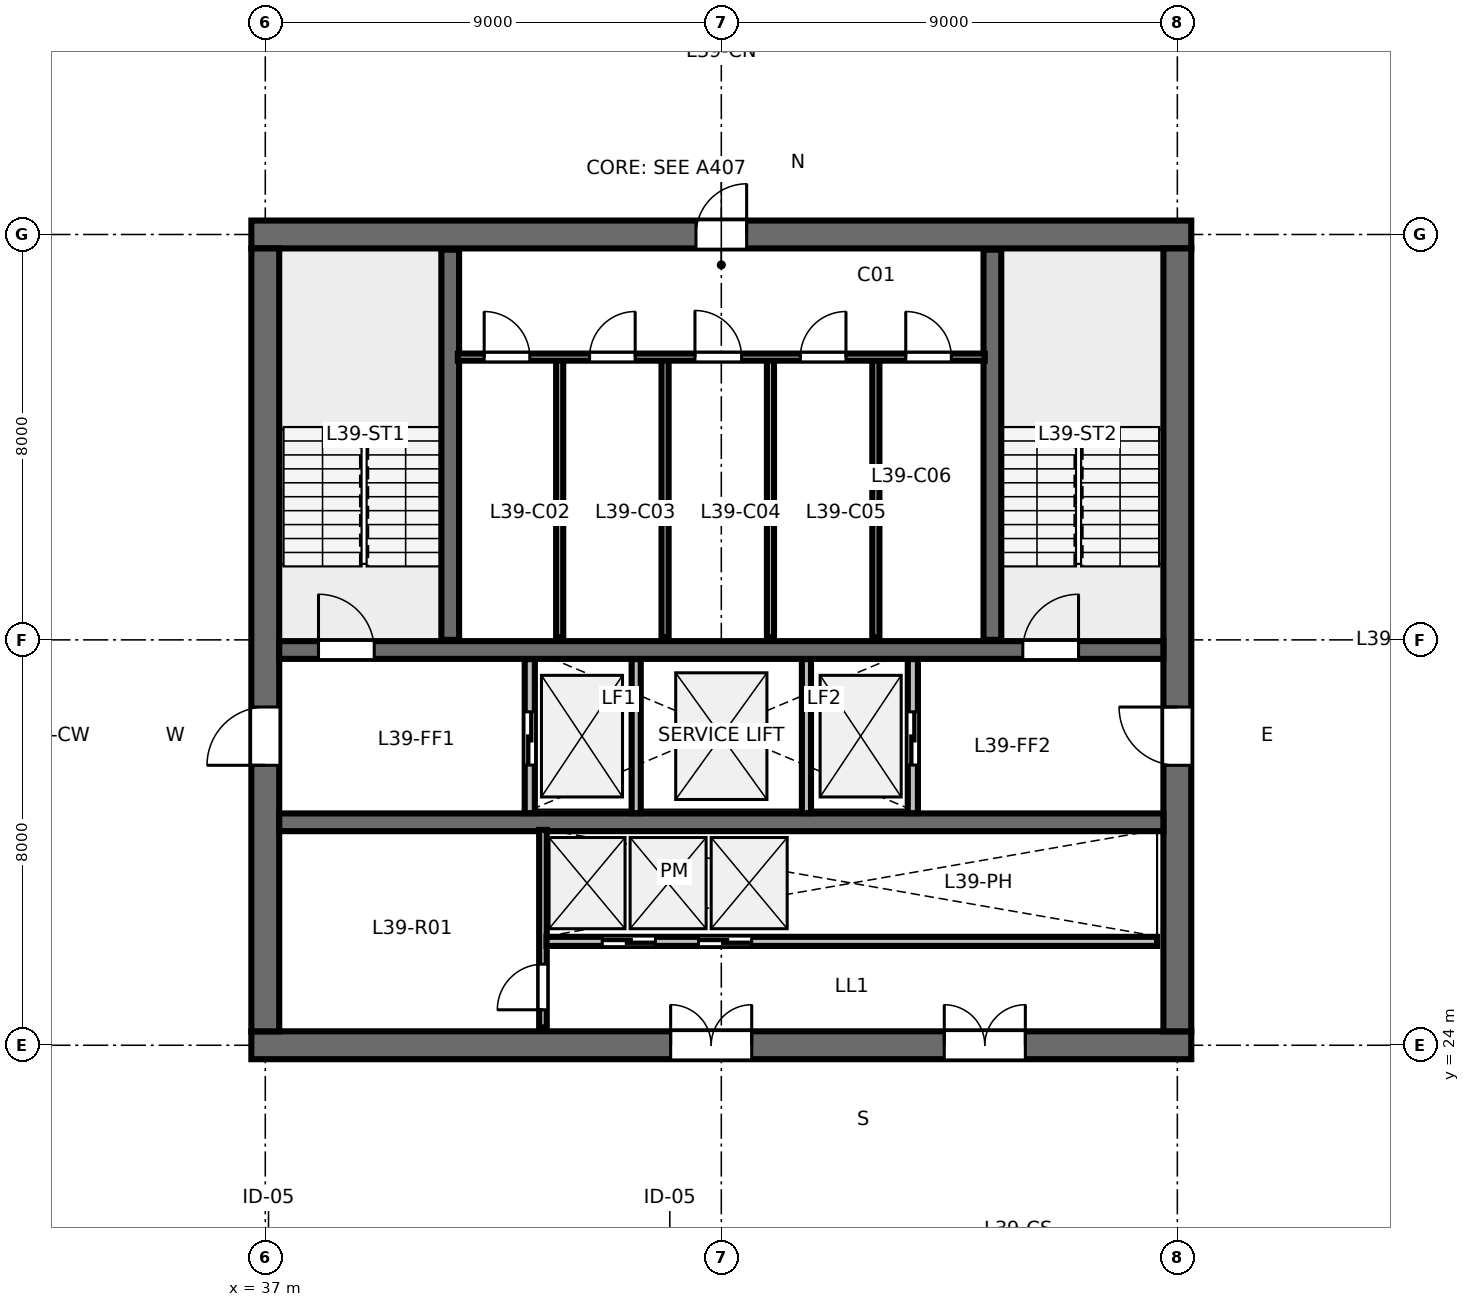
"""IFC4 building model, lengths in metres.
Left out: names, types, materials, properties, quantities, classifications, styles, units other than length and angle.
Written with IfcOpenShell. Run it as: python <this file> out.ifc"""

import sys

from ifc_helpers import new_model, si_unit, direction, frame, frame_2d, origin, place, context, subcontext, project, spatial, rectangle, extrude, element, fill, save


model = new_model("IFC4")
c1 = context("Model", 3, precision=1e-05, world=origin(), true_north=direction((0.0, 1.0)))
c2 = subcontext(c1, "Body", "Model", "MODEL_VIEW")
j1 = project(units=[si_unit("LENGTHUNIT", "METRE"), si_unit("PLANEANGLEUNIT", "RADIAN")], contexts=[c1])
p1 = place(None, origin())
s1 = spatial("IfcSite", under=j1, at=p1, CompositionType="ELEMENT")
p2 = place(p1, origin())
s2 = spatial("IfcBuilding", under=s1, at=p2, CompositionType="ELEMENT")
p3 = place(p2, frame((0.0, 0.0, 149.2)))
s3 = spatial("IfcBuildingStorey", under=s2, at=p3, CompositionType="ELEMENT", Elevation=149.2)
p4 = place(p3, frame((36.725, 24.0, 0.0), z_axis=(0.0, 0.0, 1.0), x_axis=(1.0, 0.0, 0.0)))
e1 = element("IfcWall", 1, at=p4, inside=s3, PredefinedType="SHEAR", context=c2, shape_type="SweptSolid", body=[
    extrude(rectangle(XDim=18.55, YDim=0.55, at=frame_2d((9.275, 0.0))), origin(), (0.0, 0.0, 1.0), 3.36),
])
p5 = place(p4, frame((8.275, 0.0, 0.0)))
e2 = element("IfcOpeningElement", 2, at=p5, cuts=e1, PredefinedType="OPENING", context=c2, shape_type="SweptSolid", body=[
    extrude(rectangle(XDim=1.6, YDim=2.15, at=frame_2d((0.8, 1.075))), frame((0.0, 0.285, 0.0), z_axis=(0.0, -1.0, 0.0), x_axis=(1.0, 0.0, 0.0)), (0.0, 0.0, 1.0), 0.57),
])
p6 = place(p4, frame((13.675, 0.0, 0.0)))
e3 = element("IfcOpeningElement", 3, at=p6, cuts=e1, PredefinedType="OPENING", context=c2, shape_type="SweptSolid", body=[
    extrude(rectangle(XDim=1.6, YDim=2.15, at=frame_2d((0.8, 1.075))), frame((0.0, 0.285, 0.0), z_axis=(0.0, -1.0, 0.0), x_axis=(1.0, 0.0, 0.0)), (0.0, 0.0, 1.0), 0.57),
])
p7 = place(p3, frame((36.725, 40.0, 0.0), z_axis=(0.0, 0.0, 1.0), x_axis=(1.0, 0.0, 0.0)))
e4 = element("IfcWall", 4, at=p7, inside=s3, PredefinedType="SHEAR", context=c2, shape_type="SweptSolid", body=[
    extrude(rectangle(XDim=18.55, YDim=0.55, at=frame_2d((9.275, 0.0))), origin(), (0.0, 0.0, 1.0), 3.36),
])
p8 = place(p7, frame((8.775, 0.0, 0.0)))
e5 = element("IfcOpeningElement", 5, at=p8, cuts=e4, PredefinedType="OPENING", context=c2, shape_type="SweptSolid", body=[
    extrude(rectangle(XDim=1.0, YDim=2.15, at=frame_2d((0.5, 1.075))), frame((0.0, 0.285, 0.0), z_axis=(0.0, -1.0, 0.0), x_axis=(1.0, 0.0, 0.0)), (0.0, 0.0, 1.0), 0.57),
])
p9 = place(p3, frame((37.0, 24.275, 0.0), z_axis=(0.0, 0.0, 1.0), x_axis=(0.0, 1.0, 0.0)))
e6 = element("IfcWall", 6, at=p9, inside=s3, PredefinedType="SHEAR", context=c2, shape_type="SweptSolid", body=[
    extrude(rectangle(XDim=15.45, YDim=0.55, at=frame_2d((7.725, 0.0))), origin(), (0.0, 0.0, 1.0), 3.36),
])
p10 = place(p9, frame((5.25, 0.0, 0.0)))
e7 = element("IfcOpeningElement", 7, at=p10, cuts=e6, PredefinedType="OPENING", context=c2, shape_type="SweptSolid", body=[
    extrude(rectangle(XDim=1.15, YDim=2.15, at=frame_2d((0.575, 1.075))), frame((0.0, 0.285, 0.0), z_axis=(0.0, -1.0, 0.0), x_axis=(1.0, 0.0, 0.0)), (0.0, 0.0, 1.0), 0.57),
])
p11 = place(p3, frame((55.0, 24.275, 0.0), z_axis=(0.0, 0.0, 1.0), x_axis=(0.0, 1.0, 0.0)))
e8 = element("IfcWall", 8, at=p11, inside=s3, PredefinedType="SHEAR", context=c2, shape_type="SweptSolid", body=[
    extrude(rectangle(XDim=15.45, YDim=0.55, at=frame_2d((7.725, 0.0))), origin(), (0.0, 0.0, 1.0), 3.36),
])
p12 = place(p11, frame((5.25, 0.0, 0.0)))
e9 = element("IfcOpeningElement", 9, at=p12, cuts=e8, PredefinedType="OPENING", context=c2, shape_type="SweptSolid", body=[
    extrude(rectangle(XDim=1.15, YDim=2.15, at=frame_2d((0.575, 1.075))), frame((0.0, 0.285, 0.0), z_axis=(0.0, -1.0, 0.0), x_axis=(1.0, 0.0, 0.0)), (0.0, 0.0, 1.0), 0.57),
])
p13 = place(p3, frame((37.275, 31.8, 0.0), z_axis=(0.0, 0.0, 1.0), x_axis=(1.0, 0.0, 0.0)))
e10 = element("IfcWall", 10, at=p13, inside=s3, PredefinedType="SHEAR", context=c2, shape_type="SweptSolid", body=[
    extrude(rectangle(XDim=17.45, YDim=0.35, at=frame_2d((8.725, 0.0))), origin(), (0.0, 0.0, 1.0), 3.36),
])
p14 = place(p13, frame((0.775, 0.0, 0.0)))
e11 = element("IfcOpeningElement", 11, at=p14, cuts=e10, PredefinedType="OPENING", context=c2, shape_type="SweptSolid", body=[
    extrude(rectangle(XDim=1.1, YDim=2.15, at=frame_2d((0.55, 1.075))), frame((0.0, 0.185, 0.0), z_axis=(0.0, -1.0, 0.0), x_axis=(1.0, 0.0, 0.0)), (0.0, 0.0, 1.0), 0.37),
])
p15 = place(p13, frame((14.675, 0.0, 0.0)))
e12 = element("IfcOpeningElement", 12, at=p15, cuts=e10, PredefinedType="OPENING", context=c2, shape_type="SweptSolid", body=[
    extrude(rectangle(XDim=1.1, YDim=2.15, at=frame_2d((0.55, 1.075))), frame((0.0, 0.185, 0.0), z_axis=(0.0, -1.0, 0.0), x_axis=(1.0, 0.0, 0.0)), (0.0, 0.0, 1.0), 0.37),
])
p16 = place(p3, frame((37.275, 28.4, 0.0), z_axis=(0.0, 0.0, 1.0), x_axis=(1.0, 0.0, 0.0)))
e13 = element("IfcWall", 13, at=p16, inside=s3, PredefinedType="SHEAR", context=c2, shape_type="SweptSolid", body=[
    extrude(rectangle(XDim=17.45, YDim=0.35, at=frame_2d((8.725, 0.0))), origin(), (0.0, 0.0, 1.0), 3.36),
])
for number, where, z_axis, x_axis in (
    (14, (40.65, 32.0, 0.0), (0.0, 0.0, 1.0), (0.0, 1.0, 0.0)),
    (15, (51.35, 32.0, 0.0), (0.0, 0.0, 1.0), (0.0, 1.0, 0.0)),
):
    element("IfcWall", number, at=place(p3, frame(where, z_axis=z_axis, x_axis=x_axis)), inside=s3, PredefinedType="SHEAR", context=c2, shape_type="SweptSolid", body=[
        extrude(rectangle(XDim=7.7, YDim=0.35, at=frame_2d((3.85, 0.0))), origin(), (0.0, 0.0, 1.0), 3.6),
    ])
for number, where, z_axis, x_axis in (
    (16, (42.81, 32.05, 0.0), (0.0, 0.0, 1.0), (0.0, 1.0, 0.0)),
    (17, (44.89, 32.05, 0.0), (0.0, 0.0, 1.0), (0.0, 1.0, 0.0)),
    (18, (46.97, 32.05, 0.0), (0.0, 0.0, 1.0), (0.0, 1.0, 0.0)),
    (19, (49.05, 32.05, 0.0), (0.0, 0.0, 1.0), (0.0, 1.0, 0.0)),
):
    element("IfcWall", number, at=place(p3, frame(where, z_axis=z_axis, x_axis=x_axis)), inside=s3, PredefinedType="PARTITIONING", context=c2, shape_type="SweptSolid", body=[
        extrude(rectangle(XDim=5.5, YDim=0.14, at=frame_2d((2.75, 0.0))), origin(), (0.0, 0.0, 1.0), 3.36),
    ])
p17 = place(p3, frame((40.8, 37.58, 0.0), z_axis=(0.0, 0.0, 1.0), x_axis=(1.0, 0.0, 0.0)))
e20 = element("IfcWall", 20, at=p17, inside=s3, PredefinedType="PARTITIONING", context=c2, shape_type="SweptSolid", body=[
    extrude(rectangle(XDim=10.4, YDim=0.14, at=frame_2d((5.2, 0.0))), origin(), (0.0, 0.0, 1.0), 3.36),
])
p18 = place(p17, frame((0.52, 0.0, 0.0)))
e21 = element("IfcOpeningElement", 21, at=p18, cuts=e20, PredefinedType="OPENING", context=c2, shape_type="SweptSolid", body=[
    extrude(rectangle(XDim=0.9, YDim=2.15, at=frame_2d((0.45, 1.075))), frame((0.0, 0.08, 0.0), z_axis=(0.0, -1.0, 0.0), x_axis=(1.0, 0.0, 0.0)), (0.0, 0.0, 1.0), 0.16),
])
p19 = place(p17, frame((2.6, 0.0, 0.0)))
e22 = element("IfcOpeningElement", 22, at=p19, cuts=e20, PredefinedType="OPENING", context=c2, shape_type="SweptSolid", body=[
    extrude(rectangle(XDim=0.9, YDim=2.15, at=frame_2d((0.45, 1.075))), frame((0.0, 0.08, 0.0), z_axis=(0.0, -1.0, 0.0), x_axis=(1.0, 0.0, 0.0)), (0.0, 0.0, 1.0), 0.16),
])
p20 = place(p17, frame((4.68, 0.0, 0.0)))
e23 = element("IfcOpeningElement", 23, at=p20, cuts=e20, PredefinedType="OPENING", context=c2, shape_type="SweptSolid", body=[
    extrude(rectangle(XDim=0.92, YDim=2.15, at=frame_2d((0.46, 1.075))), frame((0.0, 0.08, 0.0), z_axis=(0.0, -1.0, 0.0), x_axis=(1.0, 0.0, 0.0)), (0.0, 0.0, 1.0), 0.16),
])
p21 = place(p17, frame((6.76, 0.0, 0.0)))
e24 = element("IfcOpeningElement", 24, at=p21, cuts=e20, PredefinedType="OPENING", context=c2, shape_type="SweptSolid", body=[
    extrude(rectangle(XDim=0.9, YDim=2.15, at=frame_2d((0.45, 1.075))), frame((0.0, 0.08, 0.0), z_axis=(0.0, -1.0, 0.0), x_axis=(1.0, 0.0, 0.0)), (0.0, 0.0, 1.0), 0.16),
])
p22 = place(p17, frame((8.84, 0.0, 0.0)))
e25 = element("IfcOpeningElement", 25, at=p22, cuts=e20, PredefinedType="OPENING", context=c2, shape_type="SweptSolid", body=[
    extrude(rectangle(XDim=0.9, YDim=2.15, at=frame_2d((0.45, 1.075))), frame((0.0, 0.08, 0.0), z_axis=(0.0, -1.0, 0.0), x_axis=(1.0, 0.0, 0.0)), (0.0, 0.0, 1.0), 0.16),
])
p23 = place(p3, frame((42.22, 28.58, 0.0), z_axis=(0.0, 0.0, 1.0), x_axis=(0.0, 1.0, 0.0)))
e26 = element("IfcWall", 26, at=p23, inside=s3, PredefinedType="PARTITIONING", context=c2, shape_type="SweptSolid", body=[
    extrude(rectangle(XDim=3.04, YDim=0.2, at=frame_2d((1.52, 0.0))), origin(), (0.0, 0.0, 1.0), 3.36),
])
p24 = place(p23, frame((0.95, 0.0, 0.0)))
e27 = element("IfcOpeningElement", 27, at=p24, cuts=e26, PredefinedType="OPENING", context=c2, shape_type="SweptSolid", body=[
    extrude(rectangle(XDim=1.05, YDim=2.15, at=frame_2d((0.525, 1.075))), frame((0.0, 0.11, 0.0), z_axis=(0.0, -1.0, 0.0), x_axis=(1.0, 0.0, 0.0)), (0.0, 0.0, 1.0), 0.22),
])
p25 = place(p3, frame((49.78, 28.58, 0.0), z_axis=(0.0, 0.0, 1.0), x_axis=(0.0, 1.0, 0.0)))
e28 = element("IfcWall", 28, at=p25, inside=s3, PredefinedType="PARTITIONING", context=c2, shape_type="SweptSolid", body=[
    extrude(rectangle(XDim=3.04, YDim=0.2, at=frame_2d((1.52, 0.0))), origin(), (0.0, 0.0, 1.0), 3.36),
])
p26 = place(p25, frame((0.95, 0.0, 0.0)))
e29 = element("IfcOpeningElement", 29, at=p26, cuts=e28, PredefinedType="OPENING", context=c2, shape_type="SweptSolid", body=[
    extrude(rectangle(XDim=1.05, YDim=2.15, at=frame_2d((0.525, 1.075))), frame((0.0, 0.11, 0.0), z_axis=(0.0, -1.0, 0.0), x_axis=(1.0, 0.0, 0.0)), (0.0, 0.0, 1.0), 0.22),
])
for number, where, z_axis, x_axis in (
    (30, (44.32, 28.58, 0.0), (0.0, 0.0, 1.0), (0.0, 1.0, 0.0)),
    (31, (47.68, 28.58, 0.0), (0.0, 0.0, 1.0), (0.0, 1.0, 0.0)),
):
    element("IfcWall", number, at=place(p3, frame(where, z_axis=z_axis, x_axis=x_axis)), inside=s3, PredefinedType="PARTITIONING", context=c2, shape_type="SweptSolid", body=[
        extrude(rectangle(XDim=3.04, YDim=0.18, at=frame_2d((1.52, 0.0))), origin(), (0.0, 0.0, 1.0), 3.36),
    ])
p27 = place(p3, frame((42.48, 24.35, 0.0), z_axis=(0.0, 0.0, 1.0), x_axis=(0.0, 1.0, 0.0)))
e32 = element("IfcWall", 32, at=p27, inside=s3, PredefinedType="PARTITIONING", context=c2, shape_type="SweptSolid", body=[
    extrude(rectangle(XDim=3.9, YDim=0.15, at=frame_2d((1.95, 0.0))), origin(), (0.0, 0.0, 1.0), 3.36),
])
p28 = place(p27, frame((0.35, 0.0, 0.0)))
e33 = element("IfcOpeningElement", 33, at=p28, cuts=e32, PredefinedType="OPENING", context=c2, shape_type="SweptSolid", body=[
    extrude(rectangle(XDim=0.9, YDim=2.15, at=frame_2d((0.45, 1.075))), frame((0.0, 0.085, 0.0), z_axis=(0.0, -1.0, 0.0), x_axis=(1.0, 0.0, 0.0)), (0.0, 0.0, 1.0), 0.17),
])
p29 = place(p3, frame((42.55, 26.05, 0.0), z_axis=(0.0, 0.0, 1.0), x_axis=(1.0, 0.0, 0.0)))
e34 = element("IfcWall", 34, at=p29, inside=s3, PredefinedType="PARTITIONING", context=c2, shape_type="SweptSolid", body=[
    extrude(rectangle(XDim=12.05, YDim=0.18, at=frame_2d((6.025, 0.0))), origin(), (0.0, 0.0, 1.0), 3.36),
])
p30 = place(p29, frame((1.1, 0.0, 0.0)))
e35 = element("IfcOpeningElement", 35, at=p30, cuts=e34, PredefinedType="OPENING", context=c2, shape_type="SweptSolid", body=[
    extrude(rectangle(XDim=1.05, YDim=2.15, at=frame_2d((0.525, 1.075))), frame((0.0, 0.1, 0.0), z_axis=(0.0, -1.0, 0.0), x_axis=(1.0, 0.0, 0.0)), (0.0, 0.0, 1.0), 0.2),
])
p31 = place(p29, frame((3.0, 0.0, 0.0)))
e36 = element("IfcOpeningElement", 36, at=p31, cuts=e34, PredefinedType="OPENING", context=c2, shape_type="SweptSolid", body=[
    extrude(rectangle(XDim=1.05, YDim=2.15, at=frame_2d((0.525, 1.075))), frame((0.0, 0.1, 0.0), z_axis=(0.0, -1.0, 0.0), x_axis=(1.0, 0.0, 0.0)), (0.0, 0.0, 1.0), 0.2),
])
p32 = place(p14, origin())
e37 = element("IfcDoor", 37, at=p32, inside=s3, OperationType="SINGLE_SWING_LEFT", PredefinedType="DOOR", context=c2, shape_type="SweptSolid", body=[
    extrude(rectangle(XDim=1.1, YDim=2.15, at=frame_2d((0.55, 1.075))), frame((0.0, 0.025, 0.0), z_axis=(0.0, -1.0, 0.0), x_axis=(1.0, 0.0, 0.0)), (0.0, 0.0, 1.0), 0.05),
])
fill(e11, e37)
p33 = place(p15, origin())
e38 = element("IfcDoor", 38, at=p33, inside=s3, OperationType="SINGLE_SWING_RIGHT", PredefinedType="DOOR", context=c2, shape_type="SweptSolid", body=[
    extrude(rectangle(XDim=1.1, YDim=2.15, at=frame_2d((0.55, 1.075))), frame((0.0, 0.025, 0.0), z_axis=(0.0, -1.0, 0.0), x_axis=(1.0, 0.0, 0.0)), (0.0, 0.0, 1.0), 0.05),
])
fill(e12, e38)
p34 = place(p8, origin())
e39 = element("IfcDoor", 39, at=p34, inside=s3, OperationType="SINGLE_SWING_RIGHT", PredefinedType="DOOR", context=c2, shape_type="SweptSolid", body=[
    extrude(rectangle(XDim=1.0, YDim=2.15, at=frame_2d((0.5, 1.075))), frame((0.0, 0.025, 0.0), z_axis=(0.0, -1.0, 0.0), x_axis=(1.0, 0.0, 0.0)), (0.0, 0.0, 1.0), 0.05),
])
fill(e5, e39)
p35 = place(p10, origin())
e40 = element("IfcDoor", 40, at=p35, inside=s3, OperationType="SINGLE_SWING_LEFT", PredefinedType="DOOR", context=c2, shape_type="SweptSolid", body=[
    extrude(rectangle(XDim=1.15, YDim=2.15, at=frame_2d((0.575, 1.075))), frame((0.0, 0.025, 0.0), z_axis=(0.0, -1.0, 0.0), x_axis=(1.0, 0.0, 0.0)), (0.0, 0.0, 1.0), 0.05),
])
fill(e7, e40)
p36 = place(p12, origin())
e41 = element("IfcDoor", 41, at=p36, inside=s3, OperationType="SINGLE_SWING_RIGHT", PredefinedType="DOOR", context=c2, shape_type="SweptSolid", body=[
    extrude(rectangle(XDim=1.15, YDim=2.15, at=frame_2d((0.575, 1.075))), frame((0.0, 0.025, 0.0), z_axis=(0.0, -1.0, 0.0), x_axis=(1.0, 0.0, 0.0)), (0.0, 0.0, 1.0), 0.05),
])
fill(e9, e41)
p37 = place(p5, origin())
e42 = element("IfcDoor", 42, at=p37, inside=s3, OperationType="DOUBLE_DOOR_SINGLE_SWING", PredefinedType="DOOR", context=c2, shape_type="SweptSolid", body=[
    extrude(rectangle(XDim=1.6, YDim=2.15, at=frame_2d((0.8, 1.075))), frame((0.0, 0.025, 0.0), z_axis=(0.0, -1.0, 0.0), x_axis=(1.0, 0.0, 0.0)), (0.0, 0.0, 1.0), 0.05),
])
fill(e2, e42)
p38 = place(p6, origin())
e43 = element("IfcDoor", 43, at=p38, inside=s3, OperationType="DOUBLE_DOOR_SINGLE_SWING", PredefinedType="DOOR", context=c2, shape_type="SweptSolid", body=[
    extrude(rectangle(XDim=1.6, YDim=2.15, at=frame_2d((0.8, 1.075))), frame((0.0, 0.025, 0.0), z_axis=(0.0, -1.0, 0.0), x_axis=(1.0, 0.0, 0.0)), (0.0, 0.0, 1.0), 0.05),
])
fill(e3, e43)
p39 = place(p18, origin())
e44 = element("IfcDoor", 44, at=p39, inside=s3, OperationType="SINGLE_SWING_LEFT", PredefinedType="DOOR", context=c2, shape_type="SweptSolid", body=[
    extrude(rectangle(XDim=0.9, YDim=2.15, at=frame_2d((0.45, 1.075))), frame((0.0, 0.025, 0.0), z_axis=(0.0, -1.0, 0.0), x_axis=(1.0, 0.0, 0.0)), (0.0, 0.0, 1.0), 0.05),
])
fill(e21, e44)
p40 = place(p19, origin())
e45 = element("IfcDoor", 45, at=p40, inside=s3, OperationType="SINGLE_SWING_RIGHT", PredefinedType="DOOR", context=c2, shape_type="SweptSolid", body=[
    extrude(rectangle(XDim=0.9, YDim=2.15, at=frame_2d((0.45, 1.075))), frame((0.0, 0.025, 0.0), z_axis=(0.0, -1.0, 0.0), x_axis=(1.0, 0.0, 0.0)), (0.0, 0.0, 1.0), 0.05),
])
fill(e22, e45)
p41 = place(p20, origin())
e46 = element("IfcDoor", 46, at=p41, inside=s3, OperationType="SINGLE_SWING_LEFT", PredefinedType="DOOR", context=c2, shape_type="SweptSolid", body=[
    extrude(rectangle(XDim=0.92, YDim=2.15, at=frame_2d((0.46, 1.075))), frame((0.0, 0.025, 0.0), z_axis=(0.0, -1.0, 0.0), x_axis=(1.0, 0.0, 0.0)), (0.0, 0.0, 1.0), 0.05),
])
fill(e23, e46)
p42 = place(p21, origin())
e47 = element("IfcDoor", 47, at=p42, inside=s3, OperationType="SINGLE_SWING_RIGHT", PredefinedType="DOOR", context=c2, shape_type="SweptSolid", body=[
    extrude(rectangle(XDim=0.9, YDim=2.15, at=frame_2d((0.45, 1.075))), frame((0.0, 0.025, 0.0), z_axis=(0.0, -1.0, 0.0), x_axis=(1.0, 0.0, 0.0)), (0.0, 0.0, 1.0), 0.05),
])
fill(e24, e47)
p43 = place(p22, origin())
e48 = element("IfcDoor", 48, at=p43, inside=s3, OperationType="SINGLE_SWING_LEFT", PredefinedType="DOOR", context=c2, shape_type="SweptSolid", body=[
    extrude(rectangle(XDim=0.9, YDim=2.15, at=frame_2d((0.45, 1.075))), frame((0.0, 0.025, 0.0), z_axis=(0.0, -1.0, 0.0), x_axis=(1.0, 0.0, 0.0)), (0.0, 0.0, 1.0), 0.05),
])
fill(e25, e48)
p44 = place(p24, origin())
e49 = element("IfcDoor", 49, at=p44, inside=s3, OperationType="SLIDING_TO_LEFT", PredefinedType="DOOR", context=c2, shape_type="SweptSolid", body=[
    extrude(rectangle(XDim=1.05, YDim=2.15, at=frame_2d((0.525, 1.075))), frame((0.0, 0.025, 0.0), z_axis=(0.0, -1.0, 0.0), x_axis=(1.0, 0.0, 0.0)), (0.0, 0.0, 1.0), 0.05),
])
fill(e27, e49)
p45 = place(p26, origin())
e50 = element("IfcDoor", 50, at=p45, inside=s3, OperationType="SLIDING_TO_RIGHT", PredefinedType="DOOR", context=c2, shape_type="SweptSolid", body=[
    extrude(rectangle(XDim=1.05, YDim=2.15, at=frame_2d((0.525, 1.075))), frame((0.0, 0.025, 0.0), z_axis=(0.0, -1.0, 0.0), x_axis=(1.0, 0.0, 0.0)), (0.0, 0.0, 1.0), 0.05),
])
fill(e29, e50)
p46 = place(p28, origin())
e51 = element("IfcDoor", 51, at=p46, inside=s3, OperationType="SINGLE_SWING_LEFT", PredefinedType="DOOR", context=c2, shape_type="SweptSolid", body=[
    extrude(rectangle(XDim=0.9, YDim=2.15, at=frame_2d((0.45, 1.075))), frame((0.0, 0.025, 0.0), z_axis=(0.0, -1.0, 0.0), x_axis=(1.0, 0.0, 0.0)), (0.0, 0.0, 1.0), 0.05),
])
fill(e33, e51)
p47 = place(p30, origin())
e52 = element("IfcDoor", 52, at=p47, inside=s3, OperationType="SLIDING_TO_LEFT", PredefinedType="DOOR", context=c2, shape_type="SweptSolid", body=[
    extrude(rectangle(XDim=1.05, YDim=2.15, at=frame_2d((0.525, 1.075))), frame((0.0, 0.025, 0.0), z_axis=(0.0, -1.0, 0.0), x_axis=(1.0, 0.0, 0.0)), (0.0, 0.0, 1.0), 0.05),
])
fill(e35, e52)
p48 = place(p31, origin())
e53 = element("IfcDoor", 53, at=p48, inside=s3, OperationType="SLIDING_TO_RIGHT", PredefinedType="DOOR", context=c2, shape_type="SweptSolid", body=[
    extrude(rectangle(XDim=1.05, YDim=2.15, at=frame_2d((0.525, 1.075))), frame((0.0, 0.025, 0.0), z_axis=(0.0, -1.0, 0.0), x_axis=(1.0, 0.0, 0.0)), (0.0, 0.0, 1.0), 0.05),
])
fill(e36, e53)
save(model, sys.argv[1])
